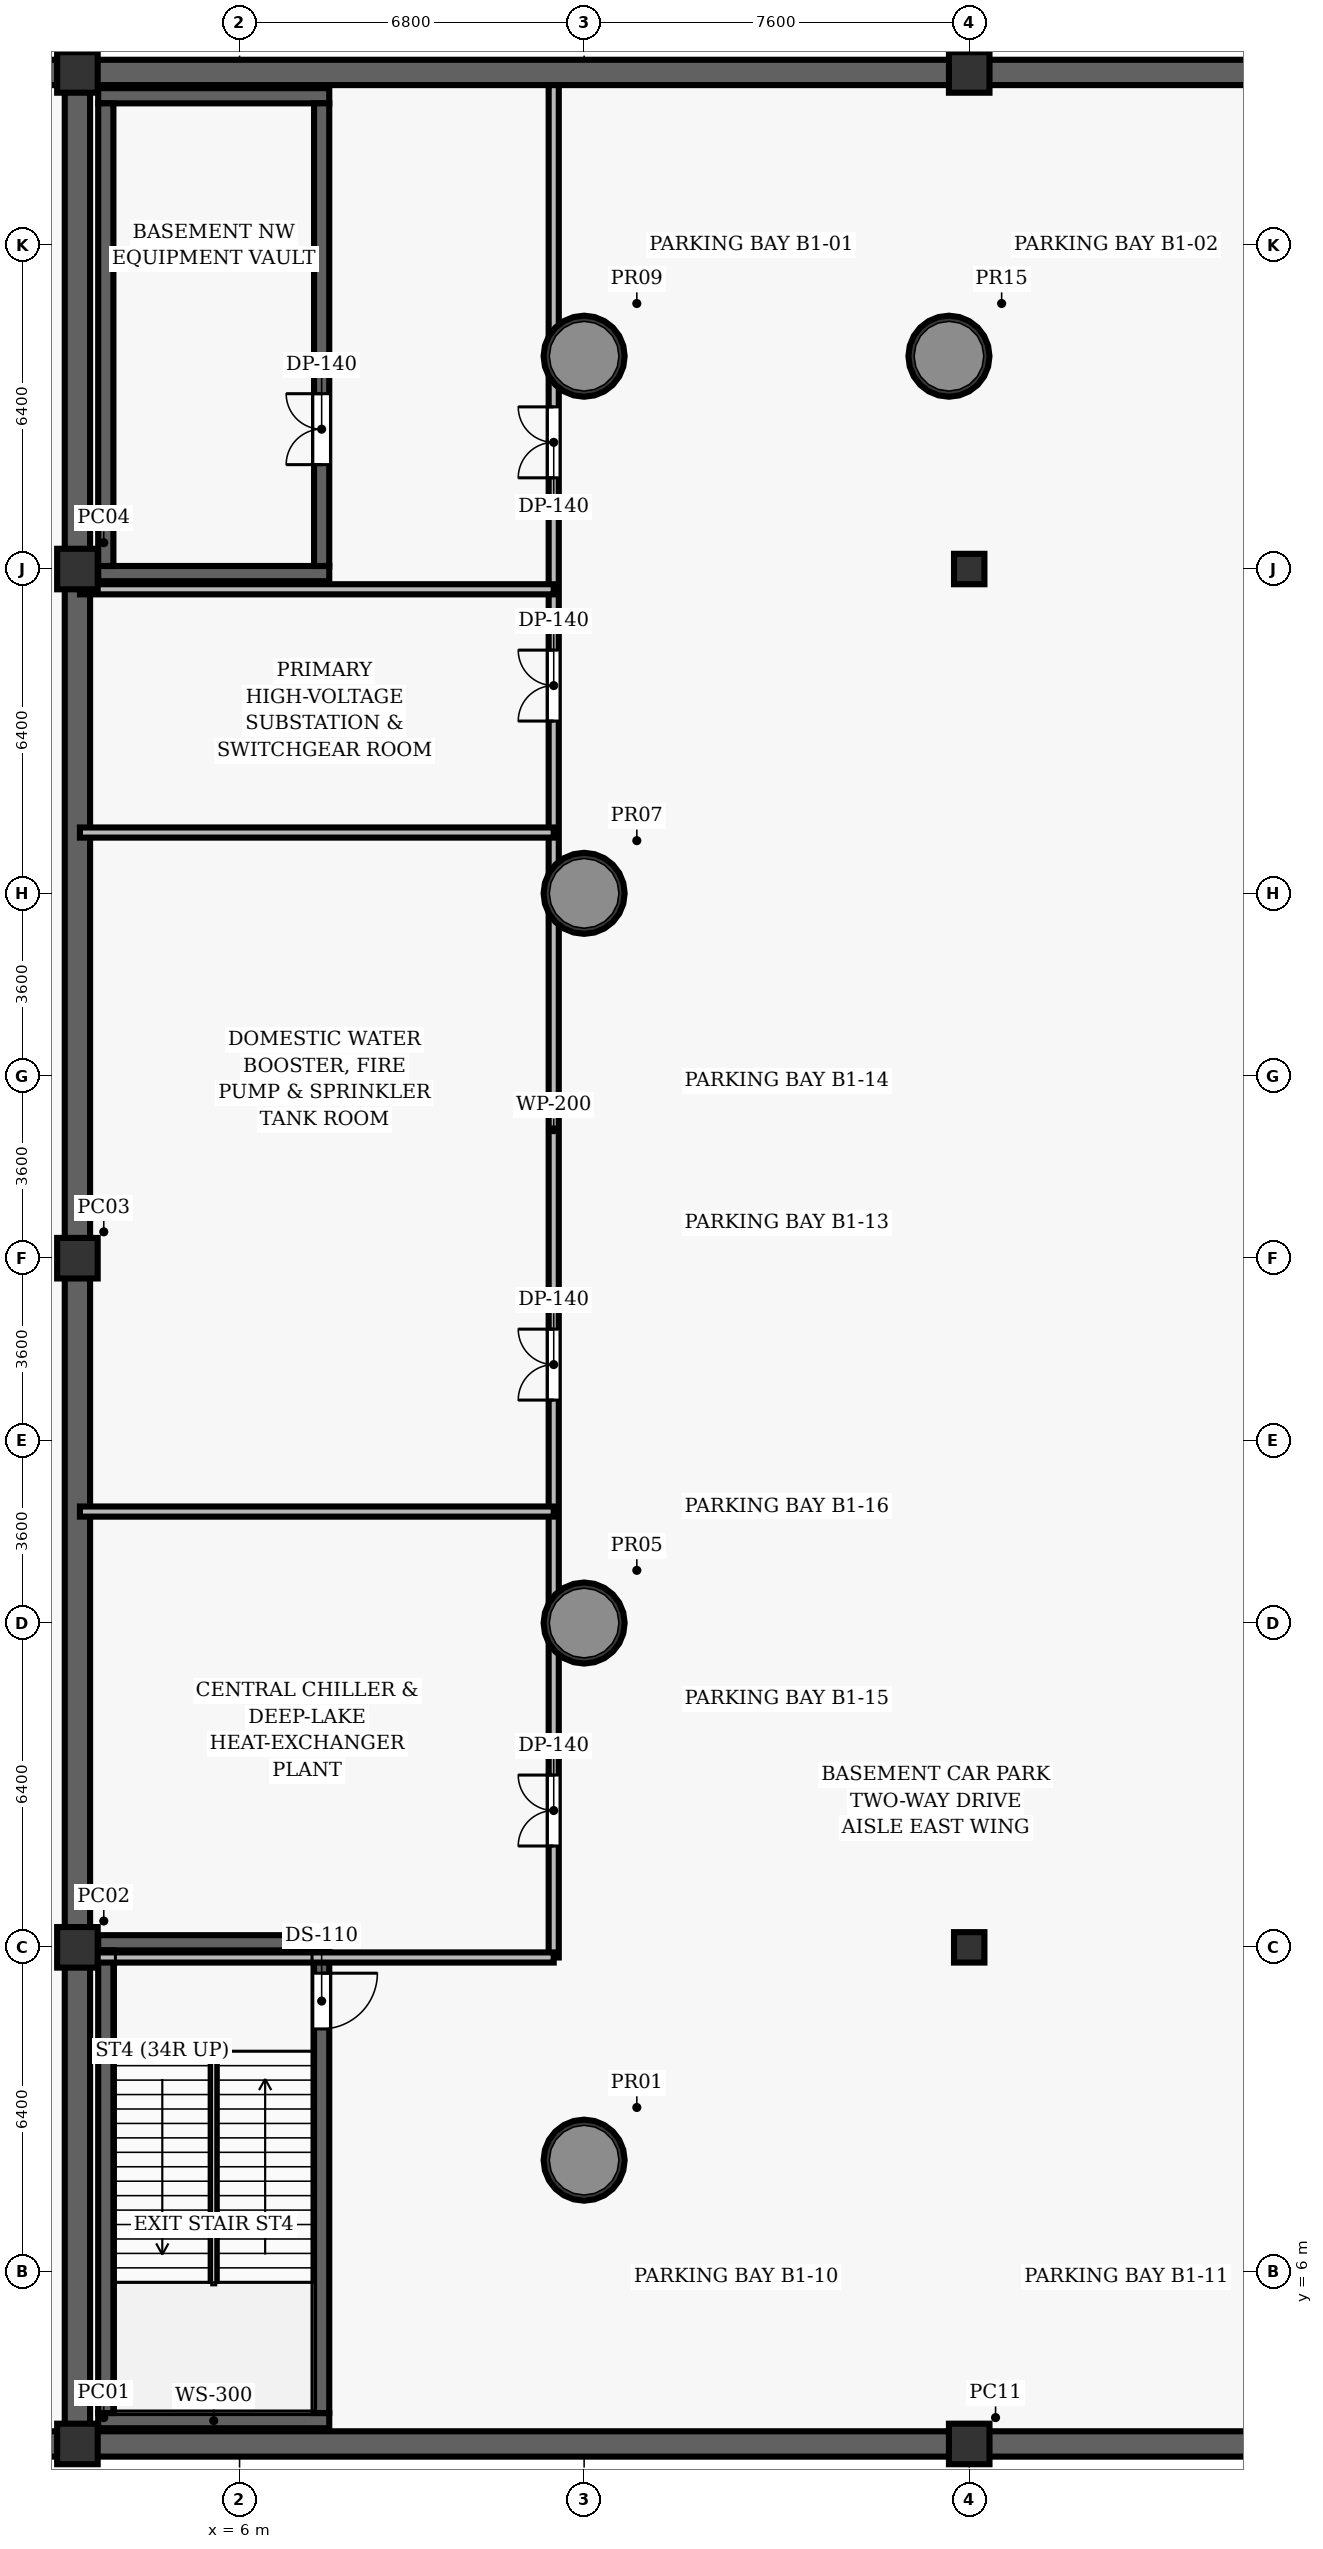
"""IFC4 building model, lengths in metres.
Left out: names, types, materials, properties, quantities, classifications, styles, units other than length and angle.
Written with IfcOpenShell. Run it as: python <this file> out.ifc"""

import sys

from ifc_helpers import new_model, si_unit, direction, frame, frame_2d, origin, origin_2d, place, context, subcontext, project, spatial, rectangle, hollow_circle, extrude, element, fill, save


model = new_model("IFC4")
c1 = context("Model", 3, precision=1e-05, world=origin(), true_north=direction((0.0, 1.0)))
c2 = subcontext(c1, "Body", "Model", "MODEL_VIEW")
j1 = project(units=[si_unit("LENGTHUNIT", "METRE"), si_unit("PLANEANGLEUNIT", "RADIAN")], contexts=[c1])
p1 = place(None, origin())
s1 = spatial("IfcSite", under=j1, at=p1, CompositionType="ELEMENT")
p2 = place(p1, origin())
s2 = spatial("IfcBuilding", under=s1, at=p2, CompositionType="ELEMENT")
p3 = place(p2, frame((0.0, 0.0, -6.0)))
s3 = spatial("IfcBuildingStorey", under=s2, at=p3, CompositionType="ELEMENT", Elevation=-6.0)
for number, where, z_axis, x_axis in (
    (1, (0.25, 2.6, -0.45), (0.0, 0.0, 1.0), (1.0, 0.0, 0.0)),
    (2, (0.25, 49.4, -0.45), (0.0, 0.0, 1.0), (1.0, 0.0, 0.0)),
):
    element("IfcWall", number, at=place(p3, frame(where, z_axis=z_axis, x_axis=x_axis)), inside=s3, PredefinedType="USERDEFINED", context=c2, shape_type="SweptSolid", body=[
        extrude(rectangle(XDim=37.75, YDim=0.5, at=frame_2d((18.875, 0.0))), origin(), (0.0, 0.0, 1.0), 6.1),
    ])
for number, where, z_axis, x_axis in (
    (3, (2.8, 2.85, -0.45), (0.0, 0.0, 1.0), (0.0, 1.0, 0.0)),
    (4, (2.8, 26.0, -0.45), (0.0, 0.0, 1.0), (0.0, 1.0, 0.0)),
):
    element("IfcWall", number, at=place(p3, frame(where, z_axis=z_axis, x_axis=x_axis)), inside=s3, PredefinedType="USERDEFINED", context=c2, shape_type="SweptSolid", body=[
        extrude(rectangle(XDim=23.15, YDim=0.5, at=frame_2d((11.575, 0.0))), origin(), (0.0, 0.0, 1.0), 6.1),
    ])
for number, where, z_axis, x_axis in (
    (5, (2.8, 2.6, -0.45), (0.0, 0.0, 1.0), (1.0, 0.0, 0.0)),
    (6, (2.8, 12.4, -0.45), (0.0, 0.0, 1.0), (1.0, 0.0, 0.0)),
    (7, (2.8, 26.0, -0.45), (0.0, 0.0, 1.0), (1.0, 0.0, 0.0)),
    (8, (2.8, 39.6, -0.45), (0.0, 0.0, 1.0), (1.0, 0.0, 0.0)),
    (9, (2.8, 49.4, -0.45), (0.0, 0.0, 1.0), (1.0, 0.0, 0.0)),
    (10, (20.4, 2.6, -0.45), (0.0, 0.0, 1.0), (1.0, 0.0, 0.0)),
    (11, (20.4, 49.4, -0.45), (0.0, 0.0, 1.0), (1.0, 0.0, 0.0)),
):
    element("IfcColumn", number, at=place(p3, frame(where, z_axis=z_axis, x_axis=x_axis)), inside=s3, PredefinedType="COLUMN", context=c2, shape_type="SweptSolid", body=[
        extrude(rectangle(XDim=0.8, YDim=0.8, at=origin_2d()), origin(), (0.0, 0.0, 1.0), 6.45),
    ])
for number, where, z_axis, x_axis in (
    (12, (12.8, 8.2, -0.45), (0.0, 0.0, 1.0), (1.0, 0.0, 0.0)),
    (13, (12.8, 18.8, -0.45), (0.0, 0.0, 1.0), (1.0, 0.0, 0.0)),
    (14, (12.8, 33.2, -0.45), (0.0, 0.0, 1.0), (1.0, 0.0, 0.0)),
    (15, (12.8, 43.8, -0.45), (0.0, 0.0, 1.0), (1.0, 0.0, 0.0)),
    (16, (20.0, 43.8, -0.45), (0.0, 0.0, 1.0), (1.0, 0.0, 0.0)),
):
    element("IfcColumn", number, at=place(p3, frame(where, z_axis=z_axis, x_axis=x_axis)), inside=s3, PredefinedType="COLUMN", context=c2, shape_type="SweptSolid", body=[
        extrude(hollow_circle(Radius=0.8, WallThickness=0.06, at=origin_2d()), origin(), (0.0, 0.0, 1.0), 6.45),
    ])
for number, where, z_axis, x_axis in (
    (17, (20.4, 12.4, -0.45), (0.0, 0.0, 1.0), (1.0, 0.0, 0.0)),
    (18, (20.4, 39.6, -0.45), (0.0, 0.0, 1.0), (1.0, 0.0, 0.0)),
):
    element("IfcColumn", number, at=place(p3, frame(where, z_axis=z_axis, x_axis=x_axis)), inside=s3, PredefinedType="COLUMN", context=c2, shape_type="SweptSolid", body=[
        extrude(rectangle(XDim=0.6, YDim=0.6, at=origin_2d()), origin(), (0.0, 0.0, 1.0), 6.45),
    ])
for number, where, z_axis, x_axis in (
    (19, (3.21, 3.06, -0.45), (0.0, 0.0, 1.0), (1.0, 0.0, 0.0)),
    (20, (3.21, 12.49, -0.45), (0.0, 0.0, 1.0), (1.0, 0.0, 0.0)),
):
    element("IfcWall", number, at=place(p3, frame(where, z_axis=z_axis, x_axis=x_axis)), inside=s3, PredefinedType="SHEAR", context=c2, shape_type="SweptSolid", body=[
        extrude(rectangle(XDim=4.56, YDim=0.3, at=frame_2d((2.28, 0.0))), origin(), (0.0, 0.0, 1.0), 6.45),
    ])
p4 = place(p3, frame((3.36, 3.21, -0.45), z_axis=(0.0, 0.0, 1.0), x_axis=(0.0, 1.0, 0.0)))
e21 = element("IfcWall", 21, at=p4, inside=s3, PredefinedType="SHEAR", context=c2, shape_type="SweptSolid", body=[
    extrude(rectangle(XDim=9.13, YDim=0.3, at=frame_2d((4.565, 0.0))), origin(), (0.0, 0.0, 1.0), 6.45),
])
p5 = place(p3, frame((7.62, 12.34, -0.45), z_axis=(0.0, 0.0, 1.0), x_axis=(0.0, -1.0, 0.0)))
e22 = element("IfcWall", 22, at=p5, inside=s3, PredefinedType="SHEAR", context=c2, shape_type="SweptSolid", body=[
    extrude(rectangle(XDim=9.13, YDim=0.3, at=frame_2d((4.565, 0.0))), origin(), (0.0, 0.0, 1.0), 6.45),
])
p6 = place(p5, frame((0.45, 0.0, 0.45)))
e23 = element("IfcOpeningElement", 23, at=p6, cuts=e22, PredefinedType="OPENING", context=c2, shape_type="SweptSolid", body=[
    extrude(rectangle(XDim=1.1, YDim=2.15, at=frame_2d((0.55, 1.075))), frame((0.0, 0.16, 0.0), z_axis=(0.0, -1.0, 0.0), x_axis=(1.0, 0.0, 0.0)), (0.0, 0.0, 1.0), 0.32),
])
for number, where, z_axis, x_axis in (
    (24, (3.21, 39.51, -0.45), (0.0, 0.0, 1.0), (1.0, 0.0, 0.0)),
    (25, (3.21, 48.94, -0.45), (0.0, 0.0, 1.0), (1.0, 0.0, 0.0)),
):
    element("IfcWall", number, at=place(p3, frame(where, z_axis=z_axis, x_axis=x_axis)), inside=s3, PredefinedType="SHEAR", context=c2, shape_type="SweptSolid", body=[
        extrude(rectangle(XDim=4.56, YDim=0.3, at=frame_2d((2.28, 0.0))), origin(), (0.0, 0.0, 1.0), 6.45),
    ])
p7 = place(p3, frame((3.36, 39.66, -0.45), z_axis=(0.0, 0.0, 1.0), x_axis=(0.0, 1.0, 0.0)))
e26 = element("IfcWall", 26, at=p7, inside=s3, PredefinedType="SHEAR", context=c2, shape_type="SweptSolid", body=[
    extrude(rectangle(XDim=9.13, YDim=0.3, at=frame_2d((4.565, 0.0))), origin(), (0.0, 0.0, 1.0), 6.45),
])
p8 = place(p3, frame((7.62, 39.66, -0.45), z_axis=(0.0, 0.0, 1.0), x_axis=(0.0, 1.0, 0.0)))
e27 = element("IfcWall", 27, at=p8, inside=s3, PredefinedType="SHEAR", context=c2, shape_type="SweptSolid", body=[
    extrude(rectangle(XDim=9.13, YDim=0.3, at=frame_2d((4.565, 0.0))), origin(), (0.0, 0.0, 1.0), 6.45),
])
p9 = place(p8, frame((2.0, 0.0, 0.45)))
e28 = element("IfcOpeningElement", 28, at=p9, cuts=e27, PredefinedType="OPENING", context=c2, shape_type="SweptSolid", body=[
    extrude(rectangle(XDim=1.4, YDim=2.25, at=frame_2d((0.7, 1.125))), frame((0.0, 0.16, 0.0), z_axis=(0.0, -1.0, 0.0), x_axis=(1.0, 0.0, 0.0)), (0.0, 0.0, 1.0), 0.32),
])
p10 = place(p3, frame((12.2, 12.2, 0.0), z_axis=(0.0, 0.0, 1.0), x_axis=(0.0, 1.0, 0.0)))
e29 = element("IfcWall", 29, at=p10, inside=s3, PredefinedType="PARTITIONING", context=c2, shape_type="SweptSolid", body=[
    extrude(rectangle(XDim=36.95, YDim=0.2, at=frame_2d((18.475, 0.0))), origin(), (0.0, 0.0, 1.0), 4.71),
])
p11 = place(p10, frame((2.2, 0.0, 0.0)))
e30 = element("IfcOpeningElement", 30, at=p11, cuts=e29, PredefinedType="OPENING", context=c2, shape_type="SweptSolid", body=[
    extrude(rectangle(XDim=1.4, YDim=2.25, at=frame_2d((0.7, 1.125))), frame((0.0, 0.11, 0.0), z_axis=(0.0, -1.0, 0.0), x_axis=(1.0, 0.0, 0.0)), (0.0, 0.0, 1.0), 0.22),
])
p12 = place(p10, frame((11.0, 0.0, 0.0)))
e31 = element("IfcOpeningElement", 31, at=p12, cuts=e29, PredefinedType="OPENING", context=c2, shape_type="SweptSolid", body=[
    extrude(rectangle(XDim=1.4, YDim=2.25, at=frame_2d((0.7, 1.125))), frame((0.0, 0.11, 0.0), z_axis=(0.0, -1.0, 0.0), x_axis=(1.0, 0.0, 0.0)), (0.0, 0.0, 1.0), 0.22),
])
p13 = place(p10, frame((24.4, 0.0, 0.0)))
e32 = element("IfcOpeningElement", 32, at=p13, cuts=e29, PredefinedType="OPENING", context=c2, shape_type="SweptSolid", body=[
    extrude(rectangle(XDim=1.4, YDim=2.25, at=frame_2d((0.7, 1.125))), frame((0.0, 0.11, 0.0), z_axis=(0.0, -1.0, 0.0), x_axis=(1.0, 0.0, 0.0)), (0.0, 0.0, 1.0), 0.22),
])
p14 = place(p10, frame((29.2, 0.0, 0.0)))
e33 = element("IfcOpeningElement", 33, at=p14, cuts=e29, PredefinedType="OPENING", context=c2, shape_type="SweptSolid", body=[
    extrude(rectangle(XDim=1.4, YDim=2.25, at=frame_2d((0.7, 1.125))), frame((0.0, 0.11, 0.0), z_axis=(0.0, -1.0, 0.0), x_axis=(1.0, 0.0, 0.0)), (0.0, 0.0, 1.0), 0.22),
])
for number, where, z_axis, x_axis in (
    (34, (2.85, 12.2, 0.0), (0.0, 0.0, 1.0), (1.0, 0.0, 0.0)),
    (35, (2.85, 21.0, 0.0), (0.0, 0.0, 1.0), (1.0, 0.0, 0.0)),
    (36, (2.85, 34.4, 0.0), (0.0, 0.0, 1.0), (1.0, 0.0, 0.0)),
    (37, (2.85, 39.2, 0.0), (0.0, 0.0, 1.0), (1.0, 0.0, 0.0)),
):
    element("IfcWall", number, at=place(p3, frame(where, z_axis=z_axis, x_axis=x_axis)), inside=s3, PredefinedType="PARTITIONING", context=c2, shape_type="SweptSolid", body=[
        extrude(rectangle(XDim=9.35, YDim=0.2, at=frame_2d((4.675, 0.0))), origin(), (0.0, 0.0, 1.0), 4.71),
    ])
p15 = place(p6, origin())
e38 = element("IfcDoor", 38, at=p15, inside=s3, OperationType="SINGLE_SWING_LEFT", PredefinedType="DOOR", context=c2, shape_type="SweptSolid", body=[
    extrude(rectangle(XDim=1.1, YDim=2.15, at=frame_2d((0.55, 1.075))), frame((0.0, 0.025, 0.0), z_axis=(0.0, -1.0, 0.0), x_axis=(1.0, 0.0, 0.0)), (0.0, 0.0, 1.0), 0.05),
])
fill(e23, e38)
p16 = place(p9, origin())
e39 = element("IfcDoor", 39, at=p16, inside=s3, OperationType="DOUBLE_DOOR_SINGLE_SWING", PredefinedType="DOOR", context=c2, shape_type="SweptSolid", body=[
    extrude(rectangle(XDim=1.4, YDim=2.25, at=frame_2d((0.7, 1.125))), frame((0.0, 0.025, 0.0), z_axis=(0.0, -1.0, 0.0), x_axis=(1.0, 0.0, 0.0)), (0.0, 0.0, 1.0), 0.05),
])
fill(e28, e39)
p17 = place(p11, origin())
e40 = element("IfcDoor", 40, at=p17, inside=s3, OperationType="DOUBLE_DOOR_SINGLE_SWING", PredefinedType="DOOR", context=c2, shape_type="SweptSolid", body=[
    extrude(rectangle(XDim=1.4, YDim=2.25, at=frame_2d((0.7, 1.125))), frame((0.0, 0.025, 0.0), z_axis=(0.0, -1.0, 0.0), x_axis=(1.0, 0.0, 0.0)), (0.0, 0.0, 1.0), 0.05),
])
fill(e30, e40)
p18 = place(p12, origin())
e41 = element("IfcDoor", 41, at=p18, inside=s3, OperationType="DOUBLE_DOOR_SINGLE_SWING", PredefinedType="DOOR", context=c2, shape_type="SweptSolid", body=[
    extrude(rectangle(XDim=1.4, YDim=2.25, at=frame_2d((0.7, 1.125))), frame((0.0, 0.025, 0.0), z_axis=(0.0, -1.0, 0.0), x_axis=(1.0, 0.0, 0.0)), (0.0, 0.0, 1.0), 0.05),
])
fill(e31, e41)
p19 = place(p13, origin())
e42 = element("IfcDoor", 42, at=p19, inside=s3, OperationType="DOUBLE_DOOR_SINGLE_SWING", PredefinedType="DOOR", context=c2, shape_type="SweptSolid", body=[
    extrude(rectangle(XDim=1.4, YDim=2.25, at=frame_2d((0.7, 1.125))), frame((0.0, 0.025, 0.0), z_axis=(0.0, -1.0, 0.0), x_axis=(1.0, 0.0, 0.0)), (0.0, 0.0, 1.0), 0.05),
])
fill(e32, e42)
p20 = place(p14, origin())
e43 = element("IfcDoor", 43, at=p20, inside=s3, OperationType="DOUBLE_DOOR_SINGLE_SWING", PredefinedType="DOOR", context=c2, shape_type="SweptSolid", body=[
    extrude(rectangle(XDim=1.4, YDim=2.25, at=frame_2d((0.7, 1.125))), frame((0.0, 0.025, 0.0), z_axis=(0.0, -1.0, 0.0), x_axis=(1.0, 0.0, 0.0)), (0.0, 0.0, 1.0), 0.05),
])
fill(e33, e43)
save(model, sys.argv[1])
